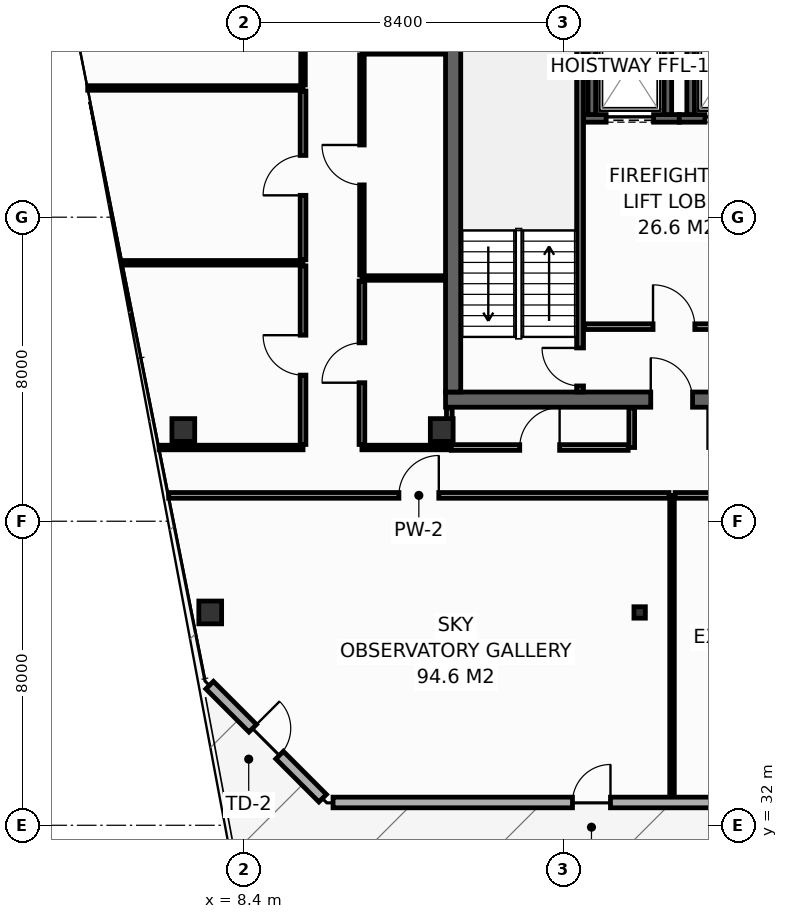
"""IFC4 building model, lengths in metres.
Left out: names, types, materials, properties, quantities, classifications, styles, units other than length and angle.
Written with IfcOpenShell. Run it as: python <this file> out.ifc"""

import sys

from ifc_helpers import new_model, si_unit, direction, frame, frame_2d, origin, origin_2d, place, context, subcontext, project, spatial, rectangle, hollow_rectangle, extrude, element, fill, save


model = new_model("IFC4")
c1 = context("Model", 3, precision=1e-05, world=origin(), true_north=direction((0.0, 1.0)))
c2 = subcontext(c1, "Body", "Model", "MODEL_VIEW")
j1 = project(units=[si_unit("LENGTHUNIT", "METRE"), si_unit("PLANEANGLEUNIT", "RADIAN")], contexts=[c1])
p1 = place(None, origin())
s1 = spatial("IfcSite", under=j1, at=p1, CompositionType="ELEMENT")
p2 = place(p1, origin())
s2 = spatial("IfcBuilding", under=s1, at=p2, CompositionType="ELEMENT")
p3 = place(p2, frame((0.0, 0.0, 295.2)))
s3 = spatial("IfcBuildingStorey", under=s2, at=p3, CompositionType="ELEMENT", Elevation=295.2)
p4 = place(p3, frame((13.7, 43.2, 0.0), z_axis=(0.0, 0.0, 1.0), x_axis=(1.0, 0.0, 0.0)))
e1 = element("IfcWall", 1, at=p4, inside=s3, PredefinedType="SHEAR", context=c2, shape_type="SweptSolid", body=[
    extrude(rectangle(XDim=32.5, YDim=0.4, at=frame_2d((16.25, 0.0))), origin(), (0.0, 0.0, 1.0), 3.55),
])
p5 = place(p4, frame((5.4, 0.0, 0.0)))
e2 = element("IfcOpeningElement", 2, at=p5, cuts=e1, PredefinedType="OPENING", context=c2, shape_type="SweptSolid", body=[
    extrude(rectangle(XDim=1.1, YDim=2.15, at=frame_2d((0.55, 1.075))), frame((0.0, 0.21, 0.0), z_axis=(0.0, -1.0, 0.0), x_axis=(1.0, 0.0, 0.0)), (0.0, 0.0, 1.0), 0.42),
])
p6 = place(p4, frame((25.6, 0.0, 0.0)))
e3 = element("IfcOpeningElement", 3, at=p6, cuts=e1, PredefinedType="OPENING", context=c2, shape_type="SweptSolid", body=[
    extrude(rectangle(XDim=1.1, YDim=2.15, at=frame_2d((0.55, 1.075))), frame((0.0, 0.21, 0.0), z_axis=(0.0, -1.0, 0.0), x_axis=(1.0, 0.0, 0.0)), (0.0, 0.0, 1.0), 0.42),
])
p7 = place(p3, frame((13.9, 43.4, 0.0), z_axis=(0.0, 0.0, 1.0), x_axis=(0.0, 1.0, 0.0)))
e4 = element("IfcWall", 4, at=p7, inside=s3, PredefinedType="SHEAR", context=c2, shape_type="SweptSolid", body=[
    extrude(rectangle(XDim=10.4, YDim=0.4, at=frame_2d((5.2, 0.0))), origin(), (0.0, 0.0, 1.0), 3.55),
])
for number, where, z_axis, x_axis in (
    (5, (6.8, 42.4, 0.0), (0.0, 0.0, 1.0), (1.0, 0.0, 0.0)),
    (6, (13.6, 42.4, 0.0), (0.0, 0.0, 1.0), (1.0, 0.0, 0.0)),
    (7, (7.508, 37.6, 0.0), (0.0, 0.0, 1.0), (1.0, 0.0, 0.0)),
):
    element("IfcColumn", number, at=place(p3, frame(where, z_axis=z_axis, x_axis=x_axis)), inside=s3, PredefinedType="COLUMN", context=c2, shape_type="SweptSolid", body=[
        extrude(hollow_rectangle(XDim=0.6, YDim=0.6, WallThickness=0.028, at=origin_2d()), origin(), (0.0, 0.0, 1.0), 3.8),
    ])
p8 = place(p3, frame((18.808, 37.6, 0.0), z_axis=(0.0, 0.0, 1.0), x_axis=(1.0, 0.0, 0.0)))
e8 = element("IfcColumn", 8, at=p8, inside=s3, PredefinedType="COLUMN", context=c2, shape_type="SweptSolid", body=[
    extrude(hollow_rectangle(XDim=0.3, YDim=0.3, WallThickness=0.012, at=origin_2d()), origin(), (0.0, 0.0, 1.0), 3.8),
])
p9 = place(p3, frame((17.33, 50.6, 0.0), z_axis=(0.0, 0.0, 1.0), x_axis=(1.0, 0.0, 0.0)))
e9 = element("IfcWall", 9, at=p9, inside=s3, PredefinedType="SHEAR", context=c2, shape_type="SweptSolid", body=[
    extrude(rectangle(XDim=2.52, YDim=0.2, at=frame_2d((1.26, 0.0))), origin(), (0.0, 0.0, 1.0), 3.55),
])
p10 = place(p9, frame((0.595, 0.0, 0.0)))
e10 = element("IfcOpeningElement", 10, at=p10, cuts=e9, PredefinedType="OPENING", context=c2, shape_type="SweptSolid", body=[
    extrude(rectangle(XDim=1.25, YDim=2.3, at=frame_2d((0.625, 1.15))), frame((0.0, 0.11, 0.0), z_axis=(0.0, -1.0, 0.0), x_axis=(1.0, 0.0, 0.0)), (0.0, 0.0, 1.0), 0.22),
])
for number, where, z_axis, x_axis in (
    (11, (17.55, 50.7, 0.0), (0.0, 0.0, 1.0), (0.0, 1.0, 0.0)),
    (12, (19.55, 50.7, 0.0), (0.0, 0.0, 1.0), (0.0, 1.0, 0.0)),
):
    element("IfcWall", number, at=place(p3, frame(where, z_axis=z_axis, x_axis=x_axis)), inside=s3, PredefinedType="SHEAR", context=c2, shape_type="SweptSolid", body=[
        extrude(rectangle(XDim=2.6, YDim=0.2, at=frame_2d((1.3, 0.0))), origin(), (0.0, 0.0, 1.0), 3.55),
    ])
p11 = place(p3, frame((19.85, 50.6, 0.0), z_axis=(0.0, 0.0, 1.0), x_axis=(1.0, 0.0, 0.0)))
e13 = element("IfcWall", 13, at=p11, inside=s3, PredefinedType="SHEAR", context=c2, shape_type="SweptSolid", body=[
    extrude(rectangle(XDim=2.65, YDim=0.2, at=frame_2d((1.325, 0.0))), origin(), (0.0, 0.0, 1.0), 3.55),
])
p12 = place(p11, frame((0.675, 0.0, 0.0)))
e14 = element("IfcOpeningElement", 14, at=p12, cuts=e13, PredefinedType="OPENING", context=c2, shape_type="SweptSolid", body=[
    extrude(rectangle(XDim=1.25, YDim=2.3, at=frame_2d((0.625, 1.15))), frame((0.0, 0.11, 0.0), z_axis=(0.0, -1.0, 0.0), x_axis=(1.0, 0.0, 0.0)), (0.0, 0.0, 1.0), 0.22),
])
p13 = place(p3, frame((20.15, 50.7, 0.0), z_axis=(0.0, 0.0, 1.0), x_axis=(0.0, 1.0, 0.0)))
e15 = element("IfcWall", 15, at=p13, inside=s3, PredefinedType="SHEAR", context=c2, shape_type="SweptSolid", body=[
    extrude(rectangle(XDim=2.6, YDim=0.2, at=frame_2d((1.3, 0.0))), origin(), (0.0, 0.0, 1.0), 3.55),
])
p14 = place(p3, frame((17.24, 43.4, 0.0), z_axis=(0.0, 0.0, 1.0), x_axis=(0.0, 1.0, 0.0)))
e16 = element("IfcWall", 16, at=p14, inside=s3, PredefinedType="SHEAR", context=c2, shape_type="SweptSolid", body=[
    extrude(rectangle(XDim=10.4, YDim=0.18, at=frame_2d((5.2, 0.0))), origin(), (0.0, 0.0, 1.0), 3.55),
])
p15 = place(p14, frame((0.16, 0.0, 0.0)))
e17 = element("IfcOpeningElement", 17, at=p15, cuts=e16, PredefinedType="OPENING", context=c2, shape_type="SweptSolid", body=[
    extrude(rectangle(XDim=1.0, YDim=2.15, at=frame_2d((0.5, 1.075))), frame((0.0, 0.1, 0.0), z_axis=(0.0, -1.0, 0.0), x_axis=(1.0, 0.0, 0.0)), (0.0, 0.0, 1.0), 0.2),
])
p16 = place(p3, frame((17.36, 45.12, 0.0), z_axis=(0.0, 0.0, 1.0), x_axis=(1.0, 0.0, 0.0)))
e18 = element("IfcWall", 18, at=p16, inside=s3, PredefinedType="PARTITIONING", context=c2, shape_type="SweptSolid", body=[
    extrude(rectangle(XDim=5.14, YDim=0.15, at=frame_2d((2.57, 0.0))), origin(), (0.0, 0.0, 1.0), 3.55),
])
p17 = place(p16, frame((1.8, 0.0, 0.0)))
e19 = element("IfcOpeningElement", 19, at=p17, cuts=e18, PredefinedType="OPENING", context=c2, shape_type="SweptSolid", body=[
    extrude(rectangle(XDim=1.1, YDim=2.15, at=frame_2d((0.55, 1.075))), frame((0.0, 0.085, 0.0), z_axis=(0.0, -1.0, 0.0), x_axis=(1.0, 0.0, 0.0)), (0.0, 0.0, 1.0), 0.17),
])
p18 = place(p3, frame((7.493, 35.687, 0.0), z_axis=(0.0, 0.0, 1.0), x_axis=(0.70707775441, -0.707135806771, 0.0)))
e20 = element("IfcWall", 20, at=p18, inside=s3, PredefinedType="STANDARD", context=c2, shape_type="SweptSolid", body=[
    extrude(rectangle(XDim=4.206, YDim=0.28, at=frame_2d((2.103, 0.0))), origin(), (0.0, 0.0, 1.0), 3.55),
])
p19 = place(p18, frame((1.603, 0.0, 0.0)))
e21 = element("IfcOpeningElement", 21, at=p19, cuts=e20, PredefinedType="OPENING", context=c2, shape_type="SweptSolid", body=[
    extrude(rectangle(XDim=1.0, YDim=2.2, at=frame_2d((0.5, 1.1))), frame((0.0, 0.15, 0.0), z_axis=(0.0, -1.0, 0.0), x_axis=(1.0, 0.0, 0.0)), (0.0, 0.0, 1.0), 0.3),
])
p20 = place(p3, frame((10.74, 32.6, 0.0), z_axis=(0.0, 0.0, 1.0), x_axis=(1.0, 0.0, 0.0)))
e22 = element("IfcWall", 22, at=p20, inside=s3, PredefinedType="STANDARD", context=c2, shape_type="SweptSolid", body=[
    extrude(rectangle(XDim=13.6, YDim=0.28, at=frame_2d((6.8, 0.0))), origin(), (0.0, 0.0, 1.0), 3.55),
])
p21 = place(p20, frame((6.3, 0.0, 0.0)))
e23 = element("IfcOpeningElement", 23, at=p21, cuts=e22, PredefinedType="OPENING", context=c2, shape_type="SweptSolid", body=[
    extrude(rectangle(XDim=1.0, YDim=2.2, at=frame_2d((0.5, 1.1))), frame((0.0, 0.15, 0.0), z_axis=(0.0, -1.0, 0.0), x_axis=(1.0, 0.0, 0.0)), (0.0, 0.0, 1.0), 0.3),
])
p22 = place(p3, frame((6.164, 41.94, 0.0), z_axis=(0.0, 0.0, 1.0), x_axis=(1.0, 0.0, 0.0)))
e24 = element("IfcWall", 24, at=p22, inside=s3, PredefinedType="PARTITIONING", context=c2, shape_type="SweptSolid", body=[
    extrude(rectangle(XDim=3.786, YDim=0.12, at=frame_2d((1.893, 0.0))), origin(), (0.0, 0.0, 1.0), 3.085),
])
p23 = place(p3, frame((11.5, 41.94, 0.0), z_axis=(0.0, 0.0, 1.0), x_axis=(1.0, 0.0, 0.0)))
e25 = element("IfcWall", 25, at=p23, inside=s3, PredefinedType="PARTITIONING", context=c2, shape_type="SweptSolid", body=[
    extrude(rectangle(XDim=2.35, YDim=0.12, at=frame_2d((1.175, 0.0))), origin(), (0.0, 0.0, 1.0), 3.55),
])
p24 = place(p3, frame((11.5, 52.35, 0.0), z_axis=(0.0, 0.0, 1.0), x_axis=(1.0, 0.0, 0.0)))
e26 = element("IfcWall", 26, at=p24, inside=s3, PredefinedType="PARTITIONING", context=c2, shape_type="SweptSolid", body=[
    extrude(rectangle(XDim=2.18, YDim=0.12, at=frame_2d((1.09, 0.0))), origin(), (0.0, 0.0, 1.0), 3.55),
])
p25 = place(p3, frame((5.198, 46.8, 0.0), z_axis=(0.0, 0.0, 1.0), x_axis=(1.0, 0.0, 0.0)))
e27 = element("IfcWall", 27, at=p25, inside=s3, PredefinedType="PARTITIONING", context=c2, shape_type="SweptSolid", body=[
    extrude(rectangle(XDim=4.752, YDim=0.12, at=frame_2d((2.376, 0.0))), origin(), (0.0, 0.0, 1.0), 2.947),
])
p26 = place(p3, frame((4.283, 51.4, 0.0), z_axis=(0.0, 0.0, 1.0), x_axis=(1.0, 0.0, 0.0)))
e28 = element("IfcWall", 28, at=p26, inside=s3, PredefinedType="PARTITIONING", context=c2, shape_type="SweptSolid", body=[
    extrude(rectangle(XDim=5.667, YDim=0.12, at=frame_2d((2.833, 0.0))), origin(), (0.0, 0.0, 1.0), 2.947),
])
p27 = place(p3, frame((9.95, 42.02, 0.0), z_axis=(0.0, 0.0, 1.0), x_axis=(0.0, 1.0, 0.0)))
e29 = element("IfcWall", 29, at=p27, inside=s3, PredefinedType="PARTITIONING", context=c2, shape_type="SweptSolid", body=[
    extrude(rectangle(XDim=4.7, YDim=0.15, at=frame_2d((2.35, 0.0))), origin(), (0.0, 0.0, 1.0), 2.947),
])
p28 = place(p27, frame((1.825, 0.0, 0.0)))
e30 = element("IfcOpeningElement", 30, at=p28, cuts=e29, PredefinedType="OPENING", context=c2, shape_type="SweptSolid", body=[
    extrude(rectangle(XDim=1.05, YDim=2.15, at=frame_2d((0.525, 1.075))), frame((0.0, 0.085, 0.0), z_axis=(0.0, -1.0, 0.0), x_axis=(1.0, 0.0, 0.0)), (0.0, 0.0, 1.0), 0.17),
])
p29 = place(p3, frame((9.95, 46.88, 0.0), z_axis=(0.0, 0.0, 1.0), x_axis=(0.0, 1.0, 0.0)))
e31 = element("IfcWall", 31, at=p29, inside=s3, PredefinedType="PARTITIONING", context=c2, shape_type="SweptSolid", body=[
    extrude(rectangle(XDim=4.44, YDim=0.15, at=frame_2d((2.22, 0.0))), origin(), (0.0, 0.0, 1.0), 3.55),
])
p30 = place(p29, frame((1.695, 0.0, 0.0)))
e32 = element("IfcOpeningElement", 32, at=p30, cuts=e31, PredefinedType="OPENING", context=c2, shape_type="SweptSolid", body=[
    extrude(rectangle(XDim=1.05, YDim=2.15, at=frame_2d((0.525, 1.075))), frame((0.0, 0.085, 0.0), z_axis=(0.0, -1.0, 0.0), x_axis=(1.0, 0.0, 0.0)), (0.0, 0.0, 1.0), 0.17),
])
p31 = place(p3, frame((9.95, 51.48, 0.0), z_axis=(0.0, 0.0, 1.0), x_axis=(0.0, 1.0, 0.0)))
e33 = element("IfcWall", 33, at=p31, inside=s3, PredefinedType="PARTITIONING", context=c2, shape_type="SweptSolid", body=[
    extrude(rectangle(XDim=4.515, YDim=0.12, at=frame_2d((2.258, 0.0))), origin(), (0.0, 0.0, 1.0), 2.935),
])
p32 = place(p31, frame((1.513, 0.0, 0.0)))
e34 = element("IfcOpeningElement", 34, at=p32, cuts=e33, PredefinedType="OPENING", context=c2, shape_type="SweptSolid", body=[
    extrude(rectangle(XDim=1.05, YDim=2.15, at=frame_2d((0.525, 1.075))), frame((0.0, 0.07, 0.0), z_axis=(0.0, -1.0, 0.0), x_axis=(1.0, 0.0, 0.0)), (0.0, 0.0, 1.0), 0.14),
])
p33 = place(p3, frame((11.5, 46.4, 0.0), z_axis=(0.0, 0.0, 1.0), x_axis=(1.0, 0.0, 0.0)))
e35 = element("IfcWall", 35, at=p33, inside=s3, PredefinedType="PARTITIONING", context=c2, shape_type="SweptSolid", body=[
    extrude(rectangle(XDim=2.18, YDim=0.12, at=frame_2d((1.09, 0.0))), origin(), (0.0, 0.0, 1.0), 3.55),
])
p34 = place(p3, frame((11.5, 42.02, 0.0), z_axis=(0.0, 0.0, 1.0), x_axis=(0.0, 1.0, 0.0)))
e36 = element("IfcWall", 36, at=p34, inside=s3, PredefinedType="PARTITIONING", context=c2, shape_type="SweptSolid", body=[
    extrude(rectangle(XDim=4.3, YDim=0.15, at=frame_2d((2.15, 0.0))), origin(), (0.0, 0.0, 1.0), 2.947),
])
p35 = place(p34, frame((1.625, 0.0, 0.0)))
e37 = element("IfcOpeningElement", 37, at=p35, cuts=e36, PredefinedType="OPENING", context=c2, shape_type="SweptSolid", body=[
    extrude(rectangle(XDim=1.05, YDim=2.15, at=frame_2d((0.525, 1.075))), frame((0.0, 0.085, 0.0), z_axis=(0.0, -1.0, 0.0), x_axis=(1.0, 0.0, 0.0)), (0.0, 0.0, 1.0), 0.17),
])
p36 = place(p3, frame((11.5, 46.48, 0.0), z_axis=(0.0, 0.0, 1.0), x_axis=(0.0, 1.0, 0.0)))
e38 = element("IfcWall", 38, at=p36, inside=s3, PredefinedType="PARTITIONING", context=c2, shape_type="SweptSolid", body=[
    extrude(rectangle(XDim=5.79, YDim=0.12, at=frame_2d((2.895, 0.0))), origin(), (0.0, 0.0, 1.0), 3.55),
])
p37 = place(p36, frame((2.37, 0.0, 0.0)))
e39 = element("IfcOpeningElement", 39, at=p37, cuts=e38, PredefinedType="OPENING", context=c2, shape_type="SweptSolid", body=[
    extrude(rectangle(XDim=1.05, YDim=2.15, at=frame_2d((0.525, 1.075))), frame((0.0, 0.07, 0.0), z_axis=(0.0, -1.0, 0.0), x_axis=(1.0, 0.0, 0.0)), (0.0, 0.0, 1.0), 0.14),
])
p38 = place(p3, frame((13.8, 42.02, 0.0), z_axis=(0.0, 0.0, 1.0), x_axis=(0.0, 1.0, 0.0)))
e40 = element("IfcWall", 40, at=p38, inside=s3, PredefinedType="PARTITIONING", context=c2, shape_type="SweptSolid", body=[
    extrude(rectangle(XDim=0.96, YDim=0.15, at=frame_2d((0.48, 0.0))), origin(), (0.0, 0.0, 1.0), 3.55),
])
p39 = place(p3, frame((18.6, 41.94, 0.0), z_axis=(0.0, 0.0, 1.0), x_axis=(0.0, 1.0, 0.0)))
e41 = element("IfcWall", 41, at=p39, inside=s3, PredefinedType="PARTITIONING", context=c2, shape_type="SweptSolid", body=[
    extrude(rectangle(XDim=1.04, YDim=0.15, at=frame_2d((0.52, 0.0))), origin(), (0.0, 0.0, 1.0), 3.55),
])
p40 = place(p3, frame((13.85, 41.94, 0.0), z_axis=(0.0, 0.0, 1.0), x_axis=(1.0, 0.0, 0.0)))
e42 = element("IfcWall", 42, at=p40, inside=s3, PredefinedType="PARTITIONING", context=c2, shape_type="SweptSolid", body=[
    extrude(rectangle(XDim=4.655, YDim=0.15, at=frame_2d((2.327, 0.0))), origin(), (0.0, 0.0, 1.0), 3.55),
])
p41 = place(p40, frame((1.802, 0.0, 0.0)))
e43 = element("IfcOpeningElement", 43, at=p41, cuts=e42, PredefinedType="OPENING", context=c2, shape_type="SweptSolid", body=[
    extrude(rectangle(XDim=1.05, YDim=2.15, at=frame_2d((0.525, 1.075))), frame((0.0, 0.085, 0.0), z_axis=(0.0, -1.0, 0.0), x_axis=(1.0, 0.0, 0.0)), (0.0, 0.0, 1.0), 0.17),
])
p42 = place(p3, frame((19.66, 32.76, 0.0), z_axis=(0.0, 0.0, 1.0), x_axis=(0.0, 1.0, 0.0)))
e44 = element("IfcWall", 44, at=p42, inside=s3, PredefinedType="PARTITIONING", context=c2, shape_type="SweptSolid", body=[
    extrude(rectangle(XDim=7.92, YDim=0.12, at=frame_2d((3.96, 0.0))), origin(), (0.0, 0.0, 1.0), 3.047),
])
p43 = place(p3, frame((6.415, 40.68, 0.0), z_axis=(0.0, 0.0, 1.0), x_axis=(1.0, 0.0, 0.0)))
e45 = element("IfcWall", 45, at=p43, inside=s3, PredefinedType="PARTITIONING", context=c2, shape_type="SweptSolid", body=[
    extrude(rectangle(XDim=13.165, YDim=0.15, at=frame_2d((6.583, 0.0))), origin(), (0.0, 0.0, 1.0), 3.085),
])
p44 = place(p43, frame((6.058, 0.0, 0.0)))
e46 = element("IfcOpeningElement", 46, at=p44, cuts=e45, PredefinedType="OPENING", context=c2, shape_type="SweptSolid", body=[
    extrude(rectangle(XDim=1.05, YDim=2.15, at=frame_2d((0.525, 1.075))), frame((0.0, 0.085, 0.0), z_axis=(0.0, -1.0, 0.0), x_axis=(1.0, 0.0, 0.0)), (0.0, 0.0, 1.0), 0.17),
])
p45 = place(p3, frame((19.74, 40.68, 0.0), z_axis=(0.0, 0.0, 1.0), x_axis=(1.0, 0.0, 0.0)))
e47 = element("IfcWall", 47, at=p45, inside=s3, PredefinedType="PARTITIONING", context=c2, shape_type="SweptSolid", body=[
    extrude(rectangle(XDim=7.812, YDim=0.15, at=frame_2d((3.906, 0.0))), origin(), (0.0, 0.0, 1.0), 3.047),
])
p46 = place(p45, frame((3.381, 0.0, 0.0)))
e48 = element("IfcOpeningElement", 48, at=p46, cuts=e47, PredefinedType="OPENING", context=c2, shape_type="SweptSolid", body=[
    extrude(rectangle(XDim=1.05, YDim=2.15, at=frame_2d((0.525, 1.075))), frame((0.0, 0.085, 0.0), z_axis=(0.0, -1.0, 0.0), x_axis=(1.0, 0.0, 0.0)), (0.0, 0.0, 1.0), 0.17),
])
p47 = place(p10, origin())
e49 = element("IfcDoor", 49, at=p47, inside=s3, OperationType="SLIDING_TO_LEFT", PredefinedType="DOOR", context=c2, shape_type="SweptSolid", body=[
    extrude(rectangle(XDim=1.25, YDim=2.3, at=frame_2d((0.625, 1.15))), frame((0.0, 0.025, 0.0), z_axis=(0.0, -1.0, 0.0), x_axis=(1.0, 0.0, 0.0)), (0.0, 0.0, 1.0), 0.05),
])
fill(e10, e49)
p48 = place(p12, origin())
e50 = element("IfcDoor", 50, at=p48, inside=s3, OperationType="SLIDING_TO_LEFT", PredefinedType="DOOR", context=c2, shape_type="SweptSolid", body=[
    extrude(rectangle(XDim=1.25, YDim=2.3, at=frame_2d((0.625, 1.15))), frame((0.0, 0.025, 0.0), z_axis=(0.0, -1.0, 0.0), x_axis=(1.0, 0.0, 0.0)), (0.0, 0.0, 1.0), 0.05),
])
fill(e14, e50)
p49 = place(p15, origin())
e51 = element("IfcDoor", 51, at=p49, inside=s3, OperationType="SINGLE_SWING_RIGHT", PredefinedType="DOOR", context=c2, shape_type="SweptSolid", body=[
    extrude(rectangle(XDim=1.0, YDim=2.15, at=frame_2d((0.5, 1.075))), frame((0.0, 0.025, 0.0), z_axis=(0.0, -1.0, 0.0), x_axis=(1.0, 0.0, 0.0)), (0.0, 0.0, 1.0), 0.05),
])
fill(e17, e51)
p50 = place(p17, origin())
e52 = element("IfcDoor", 52, at=p50, inside=s3, OperationType="SINGLE_SWING_LEFT", PredefinedType="DOOR", context=c2, shape_type="SweptSolid", body=[
    extrude(rectangle(XDim=1.1, YDim=2.15, at=frame_2d((0.55, 1.075))), frame((0.0, 0.025, 0.0), z_axis=(0.0, -1.0, 0.0), x_axis=(1.0, 0.0, 0.0)), (0.0, 0.0, 1.0), 0.05),
])
fill(e19, e52)
p51 = place(p5, origin())
e53 = element("IfcDoor", 53, at=p51, inside=s3, OperationType="SINGLE_SWING_LEFT", PredefinedType="DOOR", context=c2, shape_type="SweptSolid", body=[
    extrude(rectangle(XDim=1.1, YDim=2.15, at=frame_2d((0.55, 1.075))), frame((0.0, 0.025, 0.0), z_axis=(0.0, -1.0, 0.0), x_axis=(1.0, 0.0, 0.0)), (0.0, 0.0, 1.0), 0.05),
])
fill(e2, e53)
p52 = place(p19, origin())
e54 = element("IfcDoor", 54, at=p52, inside=s3, OperationType="SINGLE_SWING_LEFT", PredefinedType="DOOR", context=c2, shape_type="SweptSolid", body=[
    extrude(rectangle(XDim=1.0, YDim=2.2, at=frame_2d((0.5, 1.1))), frame((0.0, 0.025, 0.0), z_axis=(0.0, -1.0, 0.0), x_axis=(1.0, 0.0, 0.0)), (0.0, 0.0, 1.0), 0.05),
])
fill(e21, e54)
p53 = place(p21, origin())
e55 = element("IfcDoor", 55, at=p53, inside=s3, OperationType="SINGLE_SWING_RIGHT", PredefinedType="DOOR", context=c2, shape_type="SweptSolid", body=[
    extrude(rectangle(XDim=1.0, YDim=2.2, at=frame_2d((0.5, 1.1))), frame((0.0, 0.025, 0.0), z_axis=(0.0, -1.0, 0.0), x_axis=(1.0, 0.0, 0.0)), (0.0, 0.0, 1.0), 0.05),
])
fill(e23, e55)
p54 = place(p28, origin())
e56 = element("IfcDoor", 56, at=p54, inside=s3, OperationType="SINGLE_SWING_RIGHT", PredefinedType="DOOR", context=c2, shape_type="SweptSolid", body=[
    extrude(rectangle(XDim=1.05, YDim=2.15, at=frame_2d((0.525, 1.075))), frame((0.0, 0.025, 0.0), z_axis=(0.0, -1.0, 0.0), x_axis=(1.0, 0.0, 0.0)), (0.0, 0.0, 1.0), 0.05),
])
fill(e30, e56)
p55 = place(p30, origin())
e57 = element("IfcDoor", 57, at=p55, inside=s3, OperationType="SINGLE_SWING_LEFT", PredefinedType="DOOR", context=c2, shape_type="SweptSolid", body=[
    extrude(rectangle(XDim=1.05, YDim=2.15, at=frame_2d((0.525, 1.075))), frame((0.0, 0.025, 0.0), z_axis=(0.0, -1.0, 0.0), x_axis=(1.0, 0.0, 0.0)), (0.0, 0.0, 1.0), 0.05),
])
fill(e32, e57)
p56 = place(p35, origin())
e58 = element("IfcDoor", 58, at=p56, inside=s3, OperationType="SINGLE_SWING_LEFT", PredefinedType="DOOR", context=c2, shape_type="SweptSolid", body=[
    extrude(rectangle(XDim=1.05, YDim=2.15, at=frame_2d((0.525, 1.075))), frame((0.0, 0.025, 0.0), z_axis=(0.0, -1.0, 0.0), x_axis=(1.0, 0.0, 0.0)), (0.0, 0.0, 1.0), 0.05),
])
fill(e37, e58)
p57 = place(p37, origin())
e59 = element("IfcDoor", 59, at=p57, inside=s3, OperationType="SINGLE_SWING_RIGHT", PredefinedType="DOOR", context=c2, shape_type="SweptSolid", body=[
    extrude(rectangle(XDim=1.05, YDim=2.15, at=frame_2d((0.525, 1.075))), frame((0.0, 0.025, 0.0), z_axis=(0.0, -1.0, 0.0), x_axis=(1.0, 0.0, 0.0)), (0.0, 0.0, 1.0), 0.05),
])
fill(e39, e59)
p58 = place(p41, origin())
e60 = element("IfcDoor", 60, at=p58, inside=s3, OperationType="SINGLE_SWING_RIGHT", PredefinedType="DOOR", context=c2, shape_type="SweptSolid", body=[
    extrude(rectangle(XDim=1.05, YDim=2.15, at=frame_2d((0.525, 1.075))), frame((0.0, 0.025, 0.0), z_axis=(0.0, -1.0, 0.0), x_axis=(1.0, 0.0, 0.0)), (0.0, 0.0, 1.0), 0.05),
])
fill(e43, e60)
p59 = place(p44, origin())
e61 = element("IfcDoor", 61, at=p59, inside=s3, OperationType="SINGLE_SWING_RIGHT", PredefinedType="DOOR", context=c2, shape_type="SweptSolid", body=[
    extrude(rectangle(XDim=1.05, YDim=2.15, at=frame_2d((0.525, 1.075))), frame((0.0, 0.025, 0.0), z_axis=(0.0, -1.0, 0.0), x_axis=(1.0, 0.0, 0.0)), (0.0, 0.0, 1.0), 0.05),
])
fill(e46, e61)
save(model, sys.argv[1])
